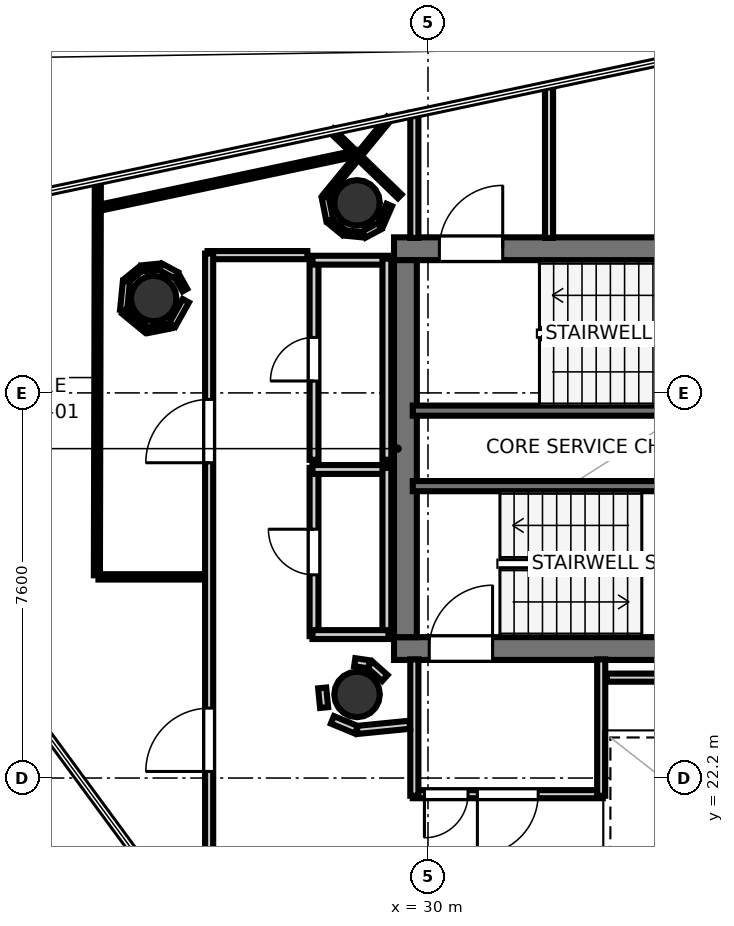
"""IFC4 building model, lengths in metres.
Left out: names, types, materials, properties, quantities, classifications, styles, units other than length and angle.
Written with IfcOpenShell. Run it as: python <this file> out.ifc"""

import sys

from ifc_helpers import new_model, si_unit, direction, frame, frame_2d, origin, origin_2d, place, context, subcontext, project, spatial, rectangle, hollow_circle, extrude, element, fill, save


model = new_model("IFC4")
c1 = context("Model", 3, precision=1e-05, world=origin(), true_north=direction((0.0, 1.0)))
c2 = subcontext(c1, "Body", "Model", "MODEL_VIEW")
j1 = project(units=[si_unit("LENGTHUNIT", "METRE"), si_unit("PLANEANGLEUNIT", "RADIAN")], contexts=[c1])
p1 = place(None, origin())
s1 = spatial("IfcSite", under=j1, at=p1, CompositionType="ELEMENT")
p2 = place(p1, origin())
s2 = spatial("IfcBuilding", under=s1, at=p2, CompositionType="ELEMENT")
p3 = place(p2, frame((0.0, 0.0, 302.8)))
s3 = spatial("IfcBuildingStorey", under=s2, at=p3, CompositionType="ELEMENT", Elevation=302.8)
p4 = place(p3, frame((29.33, 32.645, 0.0), z_axis=(0.0, 0.0, 1.0), x_axis=(1.0, 0.0, 0.0)))
e1 = element("IfcWall", 1, at=p4, inside=s3, PredefinedType="SHEAR", context=c2, shape_type="SweptSolid", body=[
    extrude(rectangle(XDim=10.52, YDim=0.45, at=frame_2d((5.26, 0.0))), origin(), (0.0, 0.0, 1.0), 3.52),
])
p5 = place(p4, frame((0.895, 0.0, 0.0)))
e2 = element("IfcOpeningElement", 2, at=p5, cuts=e1, PredefinedType="OPENING", context=c2, shape_type="SweptSolid", body=[
    extrude(rectangle(XDim=1.25, YDim=2.15, at=frame_2d((0.625, 1.075))), frame((0.0, 0.235, 0.0), z_axis=(0.0, -1.0, 0.0), x_axis=(1.0, 0.0, 0.0)), (0.0, 0.0, 1.0), 0.47),
])
p6 = place(p3, frame((29.33, 24.755, 0.0), z_axis=(0.0, 0.0, 1.0), x_axis=(1.0, 0.0, 0.0)))
e3 = element("IfcWall", 3, at=p6, inside=s3, PredefinedType="SHEAR", context=c2, shape_type="SweptSolid", body=[
    extrude(rectangle(XDim=10.52, YDim=0.45, at=frame_2d((5.26, 0.0))), origin(), (0.0, 0.0, 1.0), 3.52),
])
p7 = place(p6, frame((0.695, 0.0, 0.0)))
e4 = element("IfcOpeningElement", 4, at=p7, cuts=e3, PredefinedType="OPENING", context=c2, shape_type="SweptSolid", body=[
    extrude(rectangle(XDim=1.25, YDim=2.15, at=frame_2d((0.625, 1.075))), frame((0.0, 0.235, 0.0), z_axis=(0.0, -1.0, 0.0), x_axis=(1.0, 0.0, 0.0)), (0.0, 0.0, 1.0), 0.47),
])
p8 = place(p3, frame((29.555, 24.98, 0.0), z_axis=(0.0, 0.0, 1.0), x_axis=(0.0, 1.0, 0.0)))
e5 = element("IfcWall", 5, at=p8, inside=s3, PredefinedType="SHEAR", context=c2, shape_type="SweptSolid", body=[
    extrude(rectangle(XDim=7.44, YDim=0.45, at=frame_2d((3.72, 0.0))), origin(), (0.0, 0.0, 1.0), 3.52),
])
for number, where, z_axis, x_axis in (
    (6, (28.6, 33.55, 0.0), (0.0, 0.0, 1.0), (1.0, 0.0, 0.0)),
    (7, (28.6, 23.85, 0.0), (0.0, 0.0, 1.0), (1.0, 0.0, 0.0)),
    (8, (24.587, 31.663, 0.0), (0.0, 0.0, 1.0), (1.0, 0.0, 0.0)),
):
    element("IfcColumn", number, at=place(p3, frame(where, z_axis=z_axis, x_axis=x_axis)), inside=s3, PredefinedType="COLUMN", context=c2, shape_type="SweptSolid", body=[
        extrude(hollow_circle(Radius=0.45, WallThickness=0.025, at=origin_2d()), origin(), (0.0, 0.0, 1.0), 3.7),
    ])
p9 = place(p3, frame((29.7, 29.45, 0.0), z_axis=(0.0, 0.0, 1.0), x_axis=(1.0, 0.0, 0.0)))
e9 = element("IfcWall", 9, at=p9, inside=s3, PredefinedType="SOLIDWALL", context=c2, shape_type="SweptSolid", body=[
    extrude(rectangle(XDim=8.3, YDim=0.2, at=frame_2d((4.15, 0.0))), origin(), (0.0, 0.0, 1.0), 3.52),
])
p10 = place(p3, frame((29.7, 27.96, 0.0), z_axis=(0.0, 0.0, 1.0), x_axis=(1.0, 0.0, 0.0)))
e10 = element("IfcWall", 10, at=p10, inside=s3, PredefinedType="SOLIDWALL", context=c2, shape_type="SweptSolid", body=[
    extrude(rectangle(XDim=7.75, YDim=0.2, at=frame_2d((3.875, 0.0))), origin(), (0.0, 0.0, 1.0), 3.52),
])
p11 = place(p3, frame((29.731, 32.858, 0.0), z_axis=(0.0, 0.0, 1.0), x_axis=(0.0, 1.0, 0.0)))
e11 = element("IfcWall", 11, at=p11, inside=s3, PredefinedType="PARTITIONING", context=c2, shape_type="SweptSolid", body=[
    extrude(rectangle(XDim=2.471, YDim=0.16, at=frame_2d((1.235, 0.0))), origin(), (0.0, 0.0, 1.0), 2.84),
])
p12 = place(p3, frame((32.389, 35.892, 0.0), z_axis=(0.0, 0.0, 1.0), x_axis=(0.0, -1.0, 0.0)))
e12 = element("IfcWall", 12, at=p12, inside=s3, PredefinedType="PARTITIONING", context=c2, shape_type="SweptSolid", body=[
    extrude(rectangle(XDim=3.034, YDim=0.16, at=frame_2d((1.517, 0.0))), origin(), (0.0, 0.0, 1.0), 2.84),
])
p13 = place(p3, frame((33.45, 21.881, 0.0), z_axis=(0.0, 0.0, 1.0), x_axis=(-1.0, 0.0, 0.0)))
e13 = element("IfcWall", 13, at=p13, inside=s3, PredefinedType="PARTITIONING", context=c2, shape_type="SweptSolid", body=[
    extrude(rectangle(XDim=3.75, YDim=0.16, at=frame_2d((1.875, 0.0))), origin(), (0.0, 0.0, 1.0), 2.84),
])
p14 = place(p13, frame((1.275, 0.0, 0.0)))
e14 = element("IfcOpeningElement", 14, at=p14, cuts=e13, PredefinedType="OPENING", context=c2, shape_type="SweptSolid", body=[
    extrude(rectangle(XDim=1.2, YDim=2.15, at=frame_2d((0.6, 1.075))), frame((0.0, 0.09, 0.0), z_axis=(0.0, -1.0, 0.0), x_axis=(1.0, 0.0, 0.0)), (0.0, 0.0, 1.0), 0.18),
])
p15 = place(p13, frame((2.66, 0.0, 0.0)))
e15 = element("IfcOpeningElement", 15, at=p15, cuts=e13, PredefinedType="OPENING", context=c2, shape_type="SweptSolid", body=[
    extrude(rectangle(XDim=0.86, YDim=2.05, at=frame_2d((0.43, 1.025))), frame((0.0, 0.09, 0.0), z_axis=(0.0, -1.0, 0.0), x_axis=(1.0, 0.0, 0.0)), (0.0, 0.0, 1.0), 0.18),
])
for number, where, z_axis, x_axis in (
    (16, (29.731, 21.85, 0.0), (0.0, 0.0, 1.0), (0.0, 1.0, 0.0)),
    (17, (33.419, 24.542, 0.0), (0.0, 0.0, 1.0), (0.0, -1.0, 0.0)),
):
    element("IfcWall", number, at=place(p3, frame(where, z_axis=z_axis, x_axis=x_axis)), inside=s3, PredefinedType="PARTITIONING", context=c2, shape_type="SweptSolid", body=[
        extrude(rectangle(XDim=2.692, YDim=0.16, at=frame_2d((1.346, 0.0))), origin(), (0.0, 0.0, 1.0), 2.84),
    ])
p16 = place(p3, frame((27.751, 25.0, 0.0), z_axis=(0.0, 0.0, 1.0), x_axis=(0.0, 1.0, 0.0)))
e18 = element("IfcWall", 18, at=p16, inside=s3, PredefinedType="PLUMBINGWALL", context=c2, shape_type="SweptSolid", body=[
    extrude(rectangle(XDim=3.32, YDim=0.175, at=frame_2d((1.66, 0.0))), origin(), (0.0, 0.0, 1.0), 2.84),
])
p17 = place(p16, frame((1.21, 0.0, 0.0)))
e19 = element("IfcOpeningElement", 19, at=p17, cuts=e18, PredefinedType="OPENING", context=c2, shape_type="SweptSolid", body=[
    extrude(rectangle(XDim=0.9, YDim=2.1, at=frame_2d((0.45, 1.05))), frame((0.0, 0.097, 0.0), z_axis=(0.0, -1.0, 0.0), x_axis=(1.0, 0.0, 0.0)), (0.0, 0.0, 1.0), 0.195),
])
p18 = place(p3, frame((27.72, 28.289, 0.0), z_axis=(0.0, 0.0, 1.0), x_axis=(1.0, 0.0, 0.0)))
e20 = element("IfcWall", 20, at=p18, inside=s3, PredefinedType="PLUMBINGWALL", context=c2, shape_type="SweptSolid", body=[
    extrude(rectangle(XDim=1.5, YDim=0.175, at=frame_2d((0.75, 0.0))), origin(), (0.0, 0.0, 1.0), 2.84),
])
p19 = place(p3, frame((29.189, 28.32, 0.0), z_axis=(0.0, 0.0, 1.0), x_axis=(0.0, -1.0, 0.0)))
e21 = element("IfcWall", 21, at=p19, inside=s3, PredefinedType="PLUMBINGWALL", context=c2, shape_type="SweptSolid", body=[
    extrude(rectangle(XDim=3.32, YDim=0.175, at=frame_2d((1.66, 0.0))), origin(), (0.0, 0.0, 1.0), 2.84),
])
p20 = place(p3, frame((29.22, 25.031, 0.0), z_axis=(0.0, 0.0, 1.0), x_axis=(-1.0, 0.0, 0.0)))
e22 = element("IfcWall", 22, at=p20, inside=s3, PredefinedType="PLUMBINGWALL", context=c2, shape_type="SweptSolid", body=[
    extrude(rectangle(XDim=1.5, YDim=0.175, at=frame_2d((0.75, 0.0))), origin(), (0.0, 0.0, 1.0), 2.84),
])
p21 = place(p3, frame((27.751, 28.48, 0.0), z_axis=(0.0, 0.0, 1.0), x_axis=(0.0, 1.0, 0.0)))
e23 = element("IfcWall", 23, at=p21, inside=s3, PredefinedType="PLUMBINGWALL", context=c2, shape_type="SweptSolid", body=[
    extrude(rectangle(XDim=3.97, YDim=0.175, at=frame_2d((1.985, 0.0))), origin(), (0.0, 0.0, 1.0), 2.84),
])
p22 = place(p21, frame((1.555, 0.0, 0.0)))
e24 = element("IfcOpeningElement", 24, at=p22, cuts=e23, PredefinedType="OPENING", context=c2, shape_type="SweptSolid", body=[
    extrude(rectangle(XDim=0.86, YDim=2.05, at=frame_2d((0.43, 1.025))), frame((0.0, 0.097, 0.0), z_axis=(0.0, -1.0, 0.0), x_axis=(1.0, 0.0, 0.0)), (0.0, 0.0, 1.0), 0.195),
])
p23 = place(p3, frame((27.72, 32.419, 0.0), z_axis=(0.0, 0.0, 1.0), x_axis=(1.0, 0.0, 0.0)))
e25 = element("IfcWall", 25, at=p23, inside=s3, PredefinedType="PLUMBINGWALL", context=c2, shape_type="SweptSolid", body=[
    extrude(rectangle(XDim=1.5, YDim=0.175, at=frame_2d((0.75, 0.0))), origin(), (0.0, 0.0, 1.0), 2.84),
])
p24 = place(p3, frame((29.189, 32.45, 0.0), z_axis=(0.0, 0.0, 1.0), x_axis=(0.0, -1.0, 0.0)))
e26 = element("IfcWall", 26, at=p24, inside=s3, PredefinedType="PLUMBINGWALL", context=c2, shape_type="SweptSolid", body=[
    extrude(rectangle(XDim=3.97, YDim=0.175, at=frame_2d((1.985, 0.0))), origin(), (0.0, 0.0, 1.0), 2.84),
])
p25 = place(p3, frame((37.872, 24.181, 0.0), z_axis=(0.0, 0.0, 1.0), x_axis=(-1.0, 0.0, 0.0)))
e27 = element("IfcWall", 27, at=p25, inside=s3, PredefinedType="PARTITIONING", context=c2, shape_type="SweptSolid", body=[
    extrude(rectangle(XDim=4.342, YDim=0.16, at=frame_2d((2.171, 0.0))), origin(), (0.0, 0.0, 1.0), 2.84),
])
p26 = place(p3, frame((29.149, 24.173, 0.0), z_axis=(0.0, 0.0, 1.0), x_axis=(-0.745225165416, 0.666812906917, 0.0)))
e28 = element("IfcWall", 28, at=p26, inside=s3, PredefinedType="PARTITIONING", context=c2, shape_type="SweptSolid", body=[
    extrude(rectangle(XDim=0.396, YDim=0.16, at=frame_2d((0.198, 0.0))), origin(), (0.0, 0.0, 1.0), 2.84),
])
p27 = place(p3, frame((28.838, 24.444, 0.0), z_axis=(0.0, 0.0, 1.0), x_axis=(-0.989449148305, 0.144880581578, 0.0)))
e29 = element("IfcWall", 29, at=p27, inside=s3, PredefinedType="PARTITIONING", context=c2, shape_type="SweptSolid", body=[
    extrude(rectangle(XDim=0.286, YDim=0.16, at=frame_2d((0.143, 0.0))), origin(), (0.0, 0.0, 1.0), 2.84),
])
p28 = place(p3, frame((25.65, 32.519, 0.0), z_axis=(0.0, 0.0, 1.0), x_axis=(1.0, 0.0, 0.0)))
e30 = element("IfcWall", 30, at=p28, inside=s3, PredefinedType="PARTITIONING", context=c2, shape_type="SweptSolid", body=[
    extrude(rectangle(XDim=1.97, YDim=0.16, at=frame_2d((0.985, 0.0))), origin(), (0.0, 0.0, 1.0), 2.84),
])
p29 = place(p3, frame((27.912, 23.978, 0.0), z_axis=(0.0, 0.0, 1.0), x_axis=(0.097888269922, -0.995197410875, 0.0)))
e31 = element("IfcWall", 31, at=p29, inside=s3, PredefinedType="PARTITIONING", context=c2, shape_type="SweptSolid", body=[
    extrude(rectangle(XDim=0.389, YDim=0.16, at=frame_2d((0.195, 0.0))), origin(), (0.0, 0.0, 1.0), 2.84),
])
p30 = place(p3, frame((28.115, 23.348, 0.0), z_axis=(0.0, 0.0, 1.0), x_axis=(0.923807847969, -0.382856448334, 0.0)))
e32 = element("IfcWall", 32, at=p30, inside=s3, PredefinedType="PARTITIONING", context=c2, shape_type="SweptSolid", body=[
    extrude(rectangle(XDim=0.513, YDim=0.16, at=frame_2d((0.256, 0.0))), origin(), (0.0, 0.0, 1.0), 2.84),
])
p31 = place(p3, frame((28.603, 23.149, 0.0), z_axis=(0.0, 0.0, 1.0), x_axis=(0.995179827095, 0.098066873836, 0.0)))
e33 = element("IfcWall", 33, at=p31, inside=s3, PredefinedType="PARTITIONING", context=c2, shape_type="SweptSolid", body=[
    extrude(rectangle(XDim=1.043, YDim=0.16, at=frame_2d((0.521, 0.0))), origin(), (0.0, 0.0, 1.0), 2.84),
])
p32 = place(p3, frame((25.681, 18.702, 0.0), z_axis=(0.0, 0.0, 1.0), x_axis=(0.0, 1.0, 0.0)))
e34 = element("IfcWall", 34, at=p32, inside=s3, PredefinedType="PARTITIONING", context=c2, shape_type="SweptSolid", body=[
    extrude(rectangle(XDim=13.848, YDim=0.16, at=frame_2d((6.924, 0.0))), origin(), (0.0, 0.0, 1.0), 2.84),
])
p33 = place(p32, frame((3.627, 0.0, 0.0)))
e35 = element("IfcOpeningElement", 35, at=p33, cuts=e34, PredefinedType="OPENING", context=c2, shape_type="SweptSolid", body=[
    extrude(rectangle(XDim=1.25, YDim=2.2, at=frame_2d((0.625, 1.1))), frame((0.0, 0.09, 0.0), z_axis=(0.0, -1.0, 0.0), x_axis=(1.0, 0.0, 0.0)), (0.0, 0.0, 1.0), 0.18),
])
p34 = place(p32, frame((9.72, 0.0, 0.0)))
e36 = element("IfcOpeningElement", 36, at=p34, cuts=e34, PredefinedType="OPENING", context=c2, shape_type="SweptSolid", body=[
    extrude(rectangle(XDim=1.25, YDim=2.2, at=frame_2d((0.625, 1.1))), frame((0.0, 0.09, 0.0), z_axis=(0.0, -1.0, 0.0), x_axis=(1.0, 0.0, 0.0)), (0.0, 0.0, 1.0), 0.18),
])
p35 = place(p3, frame((23.484, 34.005, 0.0), z_axis=(0.0, 0.0, 1.0), x_axis=(-0.002377445028, -0.999997173874, 0.0)))
e37 = element("IfcWall", 37, at=p35, inside=s3, PredefinedType="PARTITIONING", context=c2, shape_type="SweptSolid", body=[
    extrude(rectangle(XDim=7.804, YDim=0.12, at=frame_2d((3.902, 0.0))), origin(), (0.0, 0.0, 1.0), 2.84),
])
p36 = place(p3, frame((23.497, 26.169, 0.0), z_axis=(0.0, 0.0, 1.0), x_axis=(1.0, 0.0, 0.0)))
e38 = element("IfcWall", 38, at=p36, inside=s3, PredefinedType="PARTITIONING", context=c2, shape_type="SweptSolid", body=[
    extrude(rectangle(XDim=2.073, YDim=0.105, at=frame_2d((1.037, 0.0))), origin(), (0.0, 0.0, 1.0), 2.84),
])
p37 = place(p3, frame((25.203, 31.829, 0.0), z_axis=(0.0, 0.0, 1.0), x_axis=(-0.488926990846, 0.872324708823, 0.0)))
e39 = element("IfcWall", 39, at=p37, inside=s3, PredefinedType="PARTITIONING", context=c2, shape_type="SweptSolid", body=[
    extrude(rectangle(XDim=0.322, YDim=0.105, at=frame_2d((0.161, 0.0))), origin(), (0.0, 0.0, 1.0), 2.84),
])
p38 = place(p3, frame((25.033, 32.122, 0.0), z_axis=(0.0, 0.0, 1.0), x_axis=(-0.881817981942, 0.471589913721, 0.0)))
e40 = element("IfcWall", 40, at=p38, inside=s3, PredefinedType="PARTITIONING", context=c2, shape_type="SweptSolid", body=[
    extrude(rectangle(XDim=0.354, YDim=0.14, at=frame_2d((0.177, 0.0))), origin(), (0.0, 0.0, 1.0), 2.84),
])
p39 = place(p3, frame((24.703, 32.292, 0.0), z_axis=(0.0, 0.0, 1.0), x_axis=(-0.995193004206, -0.097933060705, 0.0)))
e41 = element("IfcWall", 41, at=p39, inside=s3, PredefinedType="PARTITIONING", context=c2, shape_type="SweptSolid", body=[
    extrude(rectangle(XDim=0.354, YDim=0.12, at=frame_2d((0.177, 0.0))), origin(), (0.0, 0.0, 1.0), 2.84),
])
p40 = place(p3, frame((24.334, 32.25, 0.0), z_axis=(0.0, 0.0, 1.0), x_axis=(-0.773281307259, -0.634063103992, 0.0)))
e42 = element("IfcWall", 42, at=p40, inside=s3, PredefinedType="PARTITIONING", context=c2, shape_type="SweptSolid", body=[
    extrude(rectangle(XDim=0.354, YDim=0.105, at=frame_2d((0.177, 0.0))), origin(), (0.0, 0.0, 1.0), 2.84),
])
p41 = place(p3, frame((24.049, 32.005, 0.0), z_axis=(0.0, 0.0, 1.0), x_axis=(-0.098074389493, -0.995179086459, 0.0)))
e43 = element("IfcWall", 43, at=p41, inside=s3, PredefinedType="PARTITIONING", context=c2, shape_type="SweptSolid", body=[
    extrude(rectangle(XDim=0.575, YDim=0.14, at=frame_2d((0.288, 0.0))), origin(), (0.0, 0.0, 1.0), 2.84),
])
p42 = place(p3, frame((24.004, 31.406, 0.0), z_axis=(0.0, 0.0, 1.0), x_axis=(0.772934514443, -0.634485804713, 0.0)))
e44 = element("IfcWall", 44, at=p42, inside=s3, PredefinedType="PARTITIONING", context=c2, shape_type="SweptSolid", body=[
    extrude(rectangle(XDim=0.575, YDim=0.12, at=frame_2d((0.288, 0.0))), origin(), (0.0, 0.0, 1.0), 2.84),
])
p43 = place(p3, frame((24.474, 31.034, 0.0), z_axis=(0.0, 0.0, 1.0), x_axis=(0.980681129405, 0.195613195945, 0.0)))
e45 = element("IfcWall", 45, at=p43, inside=s3, PredefinedType="PARTITIONING", context=c2, shape_type="SweptSolid", body=[
    extrude(rectangle(XDim=0.467, YDim=0.105, at=frame_2d((0.233, 0.0))), origin(), (0.0, 0.0, 1.0), 2.84),
])
p44 = place(p3, frame((24.953, 31.141, 0.0), z_axis=(0.0, 0.0, 1.0), x_axis=(0.489267492682, 0.872133774489, 0.0)))
e46 = element("IfcWall", 46, at=p44, inside=s3, PredefinedType="PARTITIONING", context=c2, shape_type="SweptSolid", body=[
    extrude(rectangle(XDim=0.548, YDim=0.14, at=frame_2d((0.274, 0.0))), origin(), (0.0, 0.0, 1.0), 2.84),
])
p45 = place(p3, frame((23.581, 33.468, 0.0), z_axis=(0.0, 0.0, 1.0), x_axis=(0.978268763822, 0.207340844336, 0.0)))
e47 = element("IfcWall", 47, at=p45, inside=s3, PredefinedType="PARTITIONING", context=c2, shape_type="SweptSolid", body=[
    extrude(rectangle(XDim=5.114, YDim=0.12, at=frame_2d((2.557, 0.0))), origin(), (0.0, 0.0, 1.0), 2.84),
])
p46 = place(p3, frame((28.096, 34.979, 0.0), z_axis=(0.0, 0.0, 1.0), x_axis=(0.719392468402, -0.694603826945, 0.0)))
e48 = element("IfcWall", 48, at=p46, inside=s3, PredefinedType="PARTITIONING", context=c2, shape_type="SweptSolid", body=[
    extrude(rectangle(XDim=1.871, YDim=0.105, at=frame_2d((0.936, 0.0))), origin(), (0.0, 0.0, 1.0), 2.84),
])
p47 = place(p3, frame((29.231, 35.216, 0.0), z_axis=(0.0, 0.0, 1.0), x_axis=(-0.634428353152, -0.772981671656, 0.0)))
e49 = element("IfcWall", 49, at=p47, inside=s3, PredefinedType="PARTITIONING", context=c2, shape_type="SweptSolid", body=[
    extrude(rectangle(XDim=1.975, YDim=0.105, at=frame_2d((0.988, 0.0))), origin(), (0.0, 0.0, 1.0), 2.84),
])
p48 = place(p3, frame((27.971, 33.663, 0.0), z_axis=(0.0, 0.0, 1.0), x_axis=(0.195512911348, -0.980701127508, 0.0)))
e50 = element("IfcWall", 50, at=p48, inside=s3, PredefinedType="PARTITIONING", context=c2, shape_type="SweptSolid", body=[
    extrude(rectangle(XDim=0.467, YDim=0.14, at=frame_2d((0.233, 0.0))), origin(), (0.0, 0.0, 1.0), 2.84),
])
p49 = place(p3, frame((28.073, 33.187, 0.0), z_axis=(0.0, 0.0, 1.0), x_axis=(0.773281307259, -0.634063103992, 0.0)))
e51 = element("IfcWall", 51, at=p49, inside=s3, PredefinedType="PARTITIONING", context=c2, shape_type="SweptSolid", body=[
    extrude(rectangle(XDim=0.354, YDim=0.12, at=frame_2d((0.177, 0.0))), origin(), (0.0, 0.0, 1.0), 2.84),
])
p50 = place(p3, frame((28.364, 32.956, 0.0), z_axis=(0.0, 0.0, 1.0), x_axis=(0.995199611942, -0.097865889817, 0.0)))
e52 = element("IfcWall", 52, at=p50, inside=s3, PredefinedType="PARTITIONING", context=c2, shape_type="SweptSolid", body=[
    extrude(rectangle(XDim=0.354, YDim=0.105, at=frame_2d((0.177, 0.0))), origin(), (0.0, 0.0, 1.0), 2.84),
])
p51 = place(p3, frame((28.734, 32.924, 0.0), z_axis=(0.0, 0.0, 1.0), x_axis=(0.881817981942, 0.471589913721, 0.0)))
e53 = element("IfcWall", 53, at=p51, inside=s3, PredefinedType="PARTITIONING", context=c2, shape_type="SweptSolid", body=[
    extrude(rectangle(XDim=0.354, YDim=0.14, at=frame_2d((0.177, 0.0))), origin(), (0.0, 0.0, 1.0), 2.84),
])
p52 = place(p3, frame((29.06, 33.106, 0.0), z_axis=(0.0, 0.0, 1.0), x_axis=(0.400352069216, 0.916361402872, 0.0)))
e54 = element("IfcWall", 54, at=p52, inside=s3, PredefinedType="PARTITIONING", context=c2, shape_type="SweptSolid", body=[
    extrude(rectangle(XDim=0.439, YDim=0.12, at=frame_2d((0.219, 0.0))), origin(), (0.0, 0.0, 1.0), 2.84),
])
p53 = place(p5, origin())
e55 = element("IfcDoor", 55, at=p53, inside=s3, OperationType="SINGLE_SWING_RIGHT", PredefinedType="DOOR", context=c2, shape_type="SweptSolid", body=[
    extrude(rectangle(XDim=1.25, YDim=2.15, at=frame_2d((0.625, 1.075))), frame((0.0, 0.025, 0.0), z_axis=(0.0, -1.0, 0.0), x_axis=(1.0, 0.0, 0.0)), (0.0, 0.0, 1.0), 0.05),
])
fill(e2, e55)
p54 = place(p7, origin())
e56 = element("IfcDoor", 56, at=p54, inside=s3, OperationType="SINGLE_SWING_RIGHT", PredefinedType="DOOR", context=c2, shape_type="SweptSolid", body=[
    extrude(rectangle(XDim=1.25, YDim=2.15, at=frame_2d((0.625, 1.075))), frame((0.0, 0.025, 0.0), z_axis=(0.0, -1.0, 0.0), x_axis=(1.0, 0.0, 0.0)), (0.0, 0.0, 1.0), 0.05),
])
fill(e4, e56)
p55 = place(p14, origin())
e57 = element("IfcDoor", 57, at=p55, inside=s3, OperationType="SINGLE_SWING_RIGHT", PredefinedType="DOOR", context=c2, shape_type="SweptSolid", body=[
    extrude(rectangle(XDim=1.2, YDim=2.15, at=frame_2d((0.6, 1.075))), frame((0.0, 0.025, 0.0), z_axis=(0.0, -1.0, 0.0), x_axis=(1.0, 0.0, 0.0)), (0.0, 0.0, 1.0), 0.05),
])
fill(e14, e57)
p56 = place(p17, origin())
e58 = element("IfcDoor", 58, at=p56, inside=s3, OperationType="SINGLE_SWING_RIGHT", PredefinedType="DOOR", context=c2, shape_type="SweptSolid", body=[
    extrude(rectangle(XDim=0.9, YDim=2.1, at=frame_2d((0.45, 1.05))), frame((0.0, 0.025, 0.0), z_axis=(0.0, -1.0, 0.0), x_axis=(1.0, 0.0, 0.0)), (0.0, 0.0, 1.0), 0.05),
])
fill(e19, e58)
p57 = place(p22, origin())
e59 = element("IfcDoor", 59, at=p57, inside=s3, OperationType="SINGLE_SWING_LEFT", PredefinedType="DOOR", context=c2, shape_type="SweptSolid", body=[
    extrude(rectangle(XDim=0.86, YDim=2.05, at=frame_2d((0.43, 1.025))), frame((0.0, 0.025, 0.0), z_axis=(0.0, -1.0, 0.0), x_axis=(1.0, 0.0, 0.0)), (0.0, 0.0, 1.0), 0.05),
])
fill(e24, e59)
p58 = place(p15, origin())
e60 = element("IfcDoor", 60, at=p58, inside=s3, OperationType="SINGLE_SWING_RIGHT", PredefinedType="DOOR", context=c2, shape_type="SweptSolid", body=[
    extrude(rectangle(XDim=0.86, YDim=2.05, at=frame_2d((0.43, 1.025))), frame((0.0, 0.025, 0.0), z_axis=(0.0, -1.0, 0.0), x_axis=(1.0, 0.0, 0.0)), (0.0, 0.0, 1.0), 0.05),
])
fill(e15, e60)
p59 = place(p33, origin())
e61 = element("IfcDoor", 61, at=p59, inside=s3, OperationType="SINGLE_SWING_LEFT", PredefinedType="DOOR", context=c2, shape_type="SweptSolid", body=[
    extrude(rectangle(XDim=1.25, YDim=2.2, at=frame_2d((0.625, 1.1))), frame((0.0, 0.025, 0.0), z_axis=(0.0, -1.0, 0.0), x_axis=(1.0, 0.0, 0.0)), (0.0, 0.0, 1.0), 0.05),
])
fill(e35, e61)
p60 = place(p34, origin())
e62 = element("IfcDoor", 62, at=p60, inside=s3, OperationType="SINGLE_SWING_LEFT", PredefinedType="DOOR", context=c2, shape_type="SweptSolid", body=[
    extrude(rectangle(XDim=1.25, YDim=2.2, at=frame_2d((0.625, 1.1))), frame((0.0, 0.025, 0.0), z_axis=(0.0, -1.0, 0.0), x_axis=(1.0, 0.0, 0.0)), (0.0, 0.0, 1.0), 0.05),
])
fill(e36, e62)
save(model, sys.argv[1])
